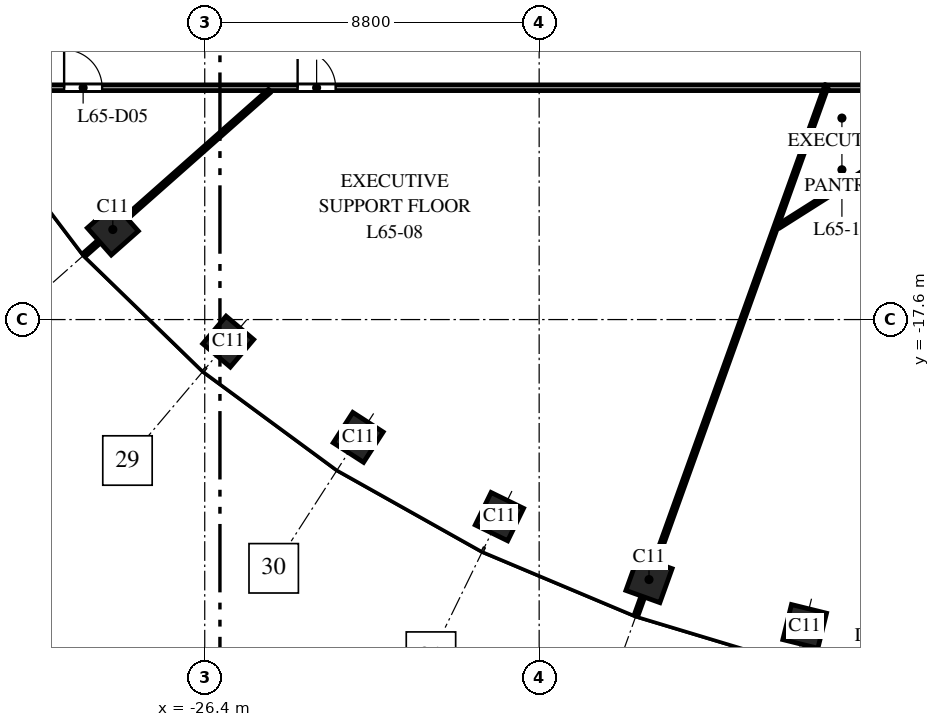
"""IFC4 building model, lengths in metres.
Left out: names, types, materials, properties, quantities, classifications, styles, units other than length and angle.
Written with IfcOpenShell. Run it as: python <this file> out.ifc"""

import sys

from ifc_helpers import new_model, si_unit, direction, frame, frame_2d, origin, origin_2d, place, context, subcontext, project, spatial, rectangle, extrude, element, fill, save


model = new_model("IFC4")
c1 = context("Model", 3, precision=1e-05, world=origin(), true_north=direction((0.0, 1.0)))
c2 = subcontext(c1, "Body", "Model", "MODEL_VIEW")
j1 = project(units=[si_unit("LENGTHUNIT", "METRE"), si_unit("PLANEANGLEUNIT", "RADIAN")], contexts=[c1])
p1 = place(None, origin())
s1 = spatial("IfcSite", under=j1, at=p1, CompositionType="ELEMENT")
p2 = place(p1, origin())
s2 = spatial("IfcBuilding", under=s1, at=p2, CompositionType="ELEMENT")
p3 = place(p2, frame((0.0, 0.0, 303.0)))
s3 = spatial("IfcBuildingStorey", under=s2, at=p3, CompositionType="ELEMENT", Elevation=303.0)
for number, where, z_axis, x_axis in (
    (1, (-28.819, -15.23, 0.0), (0.0, 0.0, 1.0), (0.663, -0.749, 0.0)),
    (2, (-25.783, -18.18, 0.0), (0.0, 0.0, 1.0), (0.763, -0.646, 0.0)),
    (3, (-22.362, -20.7, 0.0), (0.0, 0.0, 1.0), (0.84, -0.542, 0.0)),
    (4, (-18.646, -22.785, 0.0), (0.0, 0.0, 1.0), (0.898, -0.439, 0.0)),
    (5, (-14.709, -24.441, 0.0), (0.0, 0.0, 1.0), (0.941, -0.338, 0.0)),
    (6, (-10.613, -25.674, 0.0), (0.0, 0.0, 1.0), (0.971, -0.24, 0.0)),
):
    element("IfcColumn", number, at=place(p3, frame(where, z_axis=z_axis, x_axis=x_axis)), inside=s3, PredefinedType="COLUMN", context=c2, shape_type="SweptSolid", body=[
        extrude(rectangle(XDim=0.95, YDim=0.95, at=origin_2d()), origin(), (0.0, 0.0, 1.0), 4.0),
    ])
p4 = place(p3, frame((-31.5, -11.5, 0.0), z_axis=(0.0, 0.0, 1.0), x_axis=(1.0, 0.0, 0.0)))
e7 = element("IfcWall", 7, at=p4, inside=s3, PredefinedType="PARTITIONING", context=c2, shape_type="SweptSolid", body=[
    extrude(rectangle(XDim=21.432, YDim=0.15, at=frame_2d((10.716, 0.0))), origin(), (0.0, 0.0, 1.0), 2.75),
])
p5 = place(p4, frame((1.4, 0.0, 0.0)))
e8 = element("IfcOpeningElement", 8, at=p5, cuts=e7, PredefinedType="OPENING", context=c2, shape_type="SweptSolid", body=[
    extrude(rectangle(XDim=1.0, YDim=2.1, at=frame_2d((0.5, 1.05))), frame((0.0, 0.085, 0.0), z_axis=(0.0, -1.0, 0.0), x_axis=(1.0, 0.0, 0.0)), (0.0, 0.0, 1.0), 0.17),
])
p6 = place(p4, frame((7.544, 0.0, 0.0)))
e9 = element("IfcOpeningElement", 9, at=p6, cuts=e7, PredefinedType="OPENING", context=c2, shape_type="SweptSolid", body=[
    extrude(rectangle(XDim=1.0, YDim=2.1, at=frame_2d((0.5, 1.05))), frame((0.0, 0.085, 0.0), z_axis=(0.0, -1.0, 0.0), x_axis=(1.0, 0.0, 0.0)), (0.0, 0.0, 1.0), 0.17),
])
p7 = place(p3, frame((-29.569, -15.895, 0.0), z_axis=(0.0, 0.0, 1.0), x_axis=(0.748988695283, 0.662582775461, 0.0)))
e10 = element("IfcWall", 10, at=p7, inside=s3, PredefinedType="PARTITIONING", context=c2, shape_type="SweptSolid", body=[
    extrude(rectangle(XDim=6.516, YDim=0.1, at=frame_2d((3.258, 0.0))), origin(), (0.0, 0.0, 1.0), 3.0),
])
p8 = place(p3, frame((-15.049, -25.383, 0.0), z_axis=(0.0, 0.0, 1.0), x_axis=(0.338454781071, 0.94098265721, 0.0)))
e11 = element("IfcWall", 11, at=p8, inside=s3, PredefinedType="PARTITIONING", context=c2, shape_type="SweptSolid", body=[
    extrude(rectangle(XDim=14.829, YDim=0.1, at=frame_2d((7.415, 0.0))), origin(), (0.0, 0.0, 1.0), 2.75),
])
p9 = place(p3, frame((-11.319, -15.161, 0.0), z_axis=(0.0, 0.0, 1.0), x_axis=(0.844865171483, 0.534979291203, 0.0)))
e12 = element("IfcWall", 12, at=p9, inside=s3, PredefinedType="PARTITIONING", context=c2, shape_type="SweptSolid", body=[
    extrude(rectangle(XDim=6.703, YDim=0.1, at=frame_2d((3.352, 0.0))), origin(), (0.0, 0.0, 1.0), 3.7),
])
p10 = place(p3, frame((-10.003, -11.5, 0.0), z_axis=(0.0, 0.0, 1.0), x_axis=(1.0, 0.0, 0.0)))
e13 = element("IfcWall", 13, at=p10, inside=s3, PredefinedType="PARTITIONING", context=c2, shape_type="SweptSolid", body=[
    extrude(rectangle(XDim=8.271, YDim=0.15, at=frame_2d((4.135, 0.0))), origin(), (0.0, 0.0, 1.0), 2.75),
])
p11 = place(p10, frame((6.61, 0.0, 0.0)))
e14 = element("IfcOpeningElement", 14, at=p11, cuts=e13, PredefinedType="OPENING", context=c2, shape_type="SweptSolid", body=[
    extrude(rectangle(XDim=1.0, YDim=2.1, at=frame_2d((0.5, 1.05))), frame((0.0, 0.085, 0.0), z_axis=(0.0, -1.0, 0.0), x_axis=(1.0, 0.0, 0.0)), (0.0, 0.0, 1.0), 0.17),
])
p12 = place(p10, frame((1.335, 0.0, 0.0)))
e15 = element("IfcOpeningElement", 15, at=p12, cuts=e13, PredefinedType="OPENING", context=c2, shape_type="SweptSolid", body=[
    extrude(rectangle(XDim=1.0, YDim=2.1, at=frame_2d((0.5, 1.05))), frame((0.0, 0.085, 0.0), z_axis=(0.0, -1.0, 0.0), x_axis=(1.0, 0.0, 0.0)), (0.0, 0.0, 1.0), 0.17),
])
p13 = place(p5, origin())
e16 = element("IfcDoor", 16, at=p13, inside=s3, OperationType="SINGLE_SWING_LEFT", PredefinedType="DOOR", context=c2, shape_type="SweptSolid", body=[
    extrude(rectangle(XDim=1.0, YDim=2.1, at=frame_2d((0.5, 1.05))), frame((0.0, 0.025, 0.0), z_axis=(0.0, -1.0, 0.0), x_axis=(1.0, 0.0, 0.0)), (0.0, 0.0, 1.0), 0.05),
])
fill(e8, e16)
p14 = place(p6, origin())
e17 = element("IfcDoor", 17, at=p14, inside=s3, OperationType="SINGLE_SWING_LEFT", PredefinedType="DOOR", context=c2, shape_type="SweptSolid", body=[
    extrude(rectangle(XDim=1.0, YDim=2.1, at=frame_2d((0.5, 1.05))), frame((0.0, 0.025, 0.0), z_axis=(0.0, -1.0, 0.0), x_axis=(1.0, 0.0, 0.0)), (0.0, 0.0, 1.0), 0.05),
])
fill(e9, e17)
save(model, sys.argv[1])
